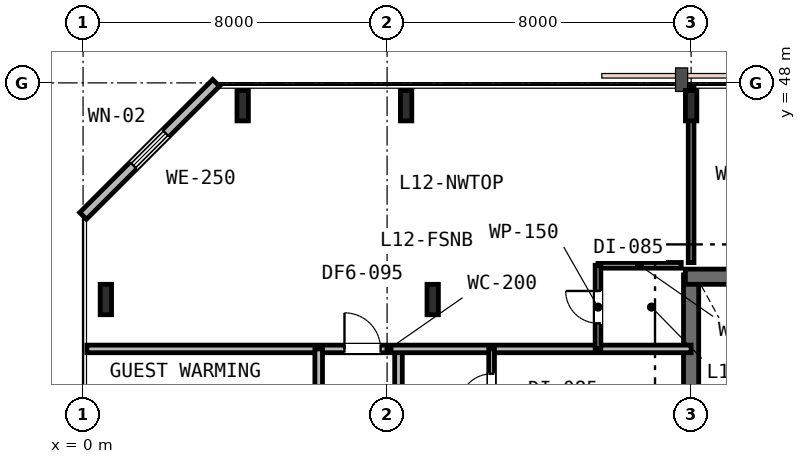
"""IFC4 building model, lengths in metres.
Left out: names, types, materials, properties, quantities, classifications, styles, units other than length and angle.
Written with IfcOpenShell. Run it as: python <this file> out.ifc"""

import sys

from ifc_helpers import new_model, si_unit, direction, frame, frame_2d, origin, origin_2d, place, context, subcontext, project, spatial, rectangle, i_section, extrude, element, fill, save


model = new_model("IFC4")
c1 = context("Model", 3, precision=1e-05, world=origin(), true_north=direction((0.0, 1.0)))
c2 = subcontext(c1, "Body", "Model", "MODEL_VIEW")
j1 = project(units=[si_unit("LENGTHUNIT", "METRE"), si_unit("PLANEANGLEUNIT", "RADIAN")], contexts=[c1])
p1 = place(None, origin())
s1 = spatial("IfcSite", under=j1, at=p1, CompositionType="ELEMENT")
p2 = place(p1, origin())
s2 = spatial("IfcBuilding", under=s1, at=p2, CompositionType="ELEMENT")
p3 = place(p2, frame((0.0, 0.0, 51.0)))
s3 = spatial("IfcBuildingStorey", under=s2, at=p3, CompositionType="ELEMENT", Elevation=51.0)
p4 = place(p3, frame((16.0, 30.65, 0.0), z_axis=(0.0, 0.0, 1.0), x_axis=(0.0, 1.0, 0.0)))
e1 = element("IfcWall", 1, at=p4, inside=s3, PredefinedType="SHEAR", context=c2, shape_type="SweptSolid", body=[
    extrude(rectangle(XDim=12.3, YDim=0.4, at=frame_2d((6.15, 0.0))), origin(), (0.0, 0.0, 1.0), 3.6),
])
p5 = place(p3, frame((15.85, 42.9, 0.0), z_axis=(0.0, 0.0, 1.0), x_axis=(1.0, 0.0, 0.0)))
e2 = element("IfcWall", 2, at=p5, inside=s3, PredefinedType="SHEAR", context=c2, shape_type="SweptSolid", body=[
    extrude(rectangle(XDim=24.3, YDim=0.4, at=frame_2d((12.15, 0.0))), origin(), (0.0, 0.0, 1.0), 3.6),
])
for number, where, z_axis, x_axis in (
    (3, (9.2, 42.3, 0.0), (0.0, 0.0, 1.0), (1.0, 0.0, 0.0)),
    (4, (0.6, 42.3, 0.0), (0.0, 0.0, 1.0), (1.0, 0.0, 0.0)),
    (5, (4.2, 47.4, 0.0), (0.0, 0.0, 1.0), (1.0, 0.0, 0.0)),
    (6, (8.5, 47.4, 0.0), (0.0, 0.0, 1.0), (1.0, 0.0, 0.0)),
    (7, (16.0, 47.4, 0.0), (0.0, 0.0, 1.0), (1.0, 0.0, 0.0)),
):
    element("IfcColumn", number, at=place(p3, frame(where, z_axis=z_axis, x_axis=x_axis)), inside=s3, PredefinedType="COLUMN", context=c2, shape_type="SweptSolid", body=[
        extrude(i_section(OverallWidth=0.3, OverallDepth=0.8, WebThickness=0.018, FlangeThickness=0.033, FilletRadius=0.03, at=origin_2d()), origin(), (0.0, 0.0, 1.0), 3.6),
    ])
p6 = place(p3, frame((3.5, 48.0, 0.0), z_axis=(0.0, 0.0, 1.0), x_axis=(-0.707106781187, -0.707106781187, 0.0)))
e8 = element("IfcWall", 8, at=p6, inside=s3, PredefinedType="STANDARD", context=c2, shape_type="SweptSolid", body=[
    extrude(rectangle(XDim=4.95, YDim=0.25, at=frame_2d((2.475, 0.0))), origin(), (0.0, 0.0, 1.0), 3.33),
])
p7 = place(p6, frame((1.875, 0.0, 0.85)))
e9 = element("IfcOpeningElement", 9, at=p7, cuts=e8, PredefinedType="OPENING", context=c2, shape_type="SweptSolid", body=[
    extrude(rectangle(XDim=1.2, YDim=1.6, at=frame_2d((0.6, 0.8))), frame((0.0, 0.135, 0.0), z_axis=(0.0, -1.0, 0.0), x_axis=(1.0, 0.0, 0.0)), (0.0, 0.0, 1.0), 0.27),
])
p8 = place(p3, frame((8.3, 30.8, 0.0), z_axis=(0.0, 0.0, 1.0), x_axis=(0.0, 1.0, 0.0)))
e10 = element("IfcWall", 10, at=p8, inside=s3, PredefinedType="PARTITIONING", context=c2, shape_type="SweptSolid", body=[
    extrude(rectangle(XDim=10.2, YDim=0.2, at=frame_2d((5.1, 0.0))), origin(), (0.0, 0.0, 1.0), 2.82),
])
p9 = place(p8, frame((1.95, 0.0, 0.0)))
e11 = element("IfcOpeningElement", 11, at=p9, cuts=e10, PredefinedType="OPENING", context=c2, shape_type="SweptSolid", body=[
    extrude(rectangle(XDim=0.9, YDim=2.15, at=frame_2d((0.45, 1.075))), frame((0.0, 0.11, 0.0), z_axis=(0.0, -1.0, 0.0), x_axis=(1.0, 0.0, 0.0)), (0.0, 0.0, 1.0), 0.22),
])
p10 = place(p8, frame((5.861, 0.0, 0.0)))
e12 = element("IfcOpeningElement", 12, at=p10, cuts=e10, PredefinedType="OPENING", context=c2, shape_type="SweptSolid", body=[
    extrude(rectangle(XDim=0.95, YDim=2.15, at=frame_2d((0.475, 1.075))), frame((0.0, 0.11, 0.0), z_axis=(0.0, -1.0, 0.0), x_axis=(1.0, 0.0, 0.0)), (0.0, 0.0, 1.0), 0.22),
])
p11 = place(p3, frame((0.1, 41.0, 0.0), z_axis=(0.0, 0.0, 1.0), x_axis=(1.0, 0.0, 0.0)))
e13 = element("IfcWall", 13, at=p11, inside=s3, PredefinedType="PARTITIONING", context=c2, shape_type="SweptSolid", body=[
    extrude(rectangle(XDim=15.9, YDim=0.2, at=frame_2d((7.95, 0.0))), origin(), (0.0, 0.0, 1.0), 2.82),
])
p12 = place(p11, frame((6.779, 0.0, 0.0)))
e14 = element("IfcOpeningElement", 14, at=p12, cuts=e13, PredefinedType="OPENING", context=c2, shape_type="SweptSolid", body=[
    extrude(rectangle(XDim=0.95, YDim=2.15, at=frame_2d((0.475, 1.075))), frame((0.0, 0.11, 0.0), z_axis=(0.0, -1.0, 0.0), x_axis=(1.0, 0.0, 0.0)), (0.0, 0.0, 1.0), 0.22),
])
p13 = place(p3, frame((13.55, 43.2, 0.0), z_axis=(0.0, 0.0, 1.0), x_axis=(1.0, 0.0, 0.0)))
e15 = element("IfcWall", 15, at=p13, inside=s3, PredefinedType="PARTITIONING", context=c2, shape_type="SweptSolid", body=[
    extrude(rectangle(XDim=2.19, YDim=0.15, at=frame_2d((1.095, 0.0))), origin(), (0.0, 0.0, 1.0), 3.33),
])
p14 = place(p3, frame((13.55, 41.0, 0.0), z_axis=(0.0, 0.0, 1.0), x_axis=(0.0, 1.0, 0.0)))
e16 = element("IfcWall", 16, at=p14, inside=s3, PredefinedType="PARTITIONING", context=c2, shape_type="SweptSolid", body=[
    extrude(rectangle(XDim=2.2, YDim=0.15, at=frame_2d((1.1, 0.0))), origin(), (0.0, 0.0, 1.0), 3.33),
])
p15 = place(p14, frame((0.675, 0.0, 0.0)))
e17 = element("IfcOpeningElement", 17, at=p15, cuts=e16, PredefinedType="OPENING", context=c2, shape_type="SweptSolid", body=[
    extrude(rectangle(XDim=0.85, YDim=2.15, at=frame_2d((0.425, 1.075))), frame((0.0, 0.085, 0.0), z_axis=(0.0, -1.0, 0.0), x_axis=(1.0, 0.0, 0.0)), (0.0, 0.0, 1.0), 0.17),
])
p16 = place(p3, frame((6.2, 28.6, 0.0), z_axis=(0.0, 0.0, 1.0), x_axis=(0.0, 1.0, 0.0)))
e18 = element("IfcWall", 18, at=p16, inside=s3, PredefinedType="PARTITIONING", context=c2, shape_type="SweptSolid", body=[
    extrude(rectangle(XDim=12.4, YDim=0.2, at=frame_2d((6.2, 0.0))), origin(), (0.0, 0.0, 1.0), 2.82),
])
p17 = place(p16, frame((3.725, 0.0, 0.0)))
e19 = element("IfcOpeningElement", 19, at=p17, cuts=e18, PredefinedType="OPENING", context=c2, shape_type="SweptSolid", body=[
    extrude(rectangle(XDim=0.95, YDim=2.15, at=frame_2d((0.475, 1.075))), frame((0.0, 0.11, 0.0), z_axis=(0.0, -1.0, 0.0), x_axis=(1.0, 0.0, 0.0)), (0.0, 0.0, 1.0), 0.22),
])
p18 = place(p16, frame((8.381, 0.0, 0.0)))
e20 = element("IfcOpeningElement", 20, at=p18, cuts=e18, PredefinedType="OPENING", context=c2, shape_type="SweptSolid", body=[
    extrude(rectangle(XDim=0.95, YDim=2.15, at=frame_2d((0.475, 1.075))), frame((0.0, 0.11, 0.0), z_axis=(0.0, -1.0, 0.0), x_axis=(1.0, 0.0, 0.0)), (0.0, 0.0, 1.0), 0.22),
])
p19 = place(p3, frame((10.75, 38.84, 0.0), z_axis=(0.0, 0.0, 1.0), x_axis=(0.0, 1.0, 0.0)))
e21 = element("IfcWall", 21, at=p19, inside=s3, PredefinedType="PARTITIONING", context=c2, shape_type="SweptSolid", body=[
    extrude(rectangle(XDim=2.16, YDim=0.15, at=frame_2d((1.08, 0.0))), origin(), (0.0, 0.0, 1.0), 3.33),
])
p20 = place(p19, frame((0.655, 0.0, 0.0)))
e22 = element("IfcOpeningElement", 22, at=p20, cuts=e21, PredefinedType="OPENING", context=c2, shape_type="SweptSolid", body=[
    extrude(rectangle(XDim=0.85, YDim=2.15, at=frame_2d((0.425, 1.075))), frame((0.0, 0.085, 0.0), z_axis=(0.0, -1.0, 0.0), x_axis=(1.0, 0.0, 0.0)), (0.0, 0.0, 1.0), 0.17),
])
p21 = place(p3, frame((16.0, 43.27, 0.0), z_axis=(0.0, 0.0, 1.0), x_axis=(0.0, 1.0, 0.0)))
e23 = element("IfcWall", 23, at=p21, inside=s3, PredefinedType="PARTITIONING", context=c2, shape_type="SweptSolid", body=[
    extrude(rectangle(XDim=4.63, YDim=0.15, at=frame_2d((2.315, 0.0))), origin(), (0.0, 0.0, 1.0), 2.93),
])
p22 = place(p7, origin())
e24 = element("IfcWindow", 24, at=p22, inside=s3, PartitioningType="SINGLE_PANEL", PredefinedType="WINDOW", context=c2, shape_type="SweptSolid", body=[
    extrude(rectangle(XDim=1.2, YDim=1.6, at=frame_2d((0.6, 0.8))), frame((0.0, 0.03, 0.0), z_axis=(0.0, -1.0, 0.0), x_axis=(1.0, 0.0, 0.0)), (0.0, 0.0, 1.0), 0.06),
])
fill(e9, e24)
p23 = place(p12, origin())
e25 = element("IfcDoor", 25, at=p23, inside=s3, OperationType="SINGLE_SWING_LEFT", PredefinedType="DOOR", context=c2, shape_type="SweptSolid", body=[
    extrude(rectangle(XDim=0.95, YDim=2.15, at=frame_2d((0.475, 1.075))), frame((0.0, 0.025, 0.0), z_axis=(0.0, -1.0, 0.0), x_axis=(1.0, 0.0, 0.0)), (0.0, 0.0, 1.0), 0.05),
])
fill(e14, e25)
p24 = place(p15, origin())
e26 = element("IfcDoor", 26, at=p24, inside=s3, OperationType="SINGLE_SWING_RIGHT", PredefinedType="DOOR", context=c2, shape_type="SweptSolid", body=[
    extrude(rectangle(XDim=0.85, YDim=2.15, at=frame_2d((0.425, 1.075))), frame((0.0, 0.025, 0.0), z_axis=(0.0, -1.0, 0.0), x_axis=(1.0, 0.0, 0.0)), (0.0, 0.0, 1.0), 0.05),
])
fill(e17, e26)
p25 = place(p20, origin())
e27 = element("IfcDoor", 27, at=p25, inside=s3, OperationType="SINGLE_SWING_LEFT", PredefinedType="DOOR", context=c2, shape_type="SweptSolid", body=[
    extrude(rectangle(XDim=0.85, YDim=2.15, at=frame_2d((0.425, 1.075))), frame((0.0, 0.025, 0.0), z_axis=(0.0, -1.0, 0.0), x_axis=(1.0, 0.0, 0.0)), (0.0, 0.0, 1.0), 0.05),
])
fill(e22, e27)
save(model, sys.argv[1])
